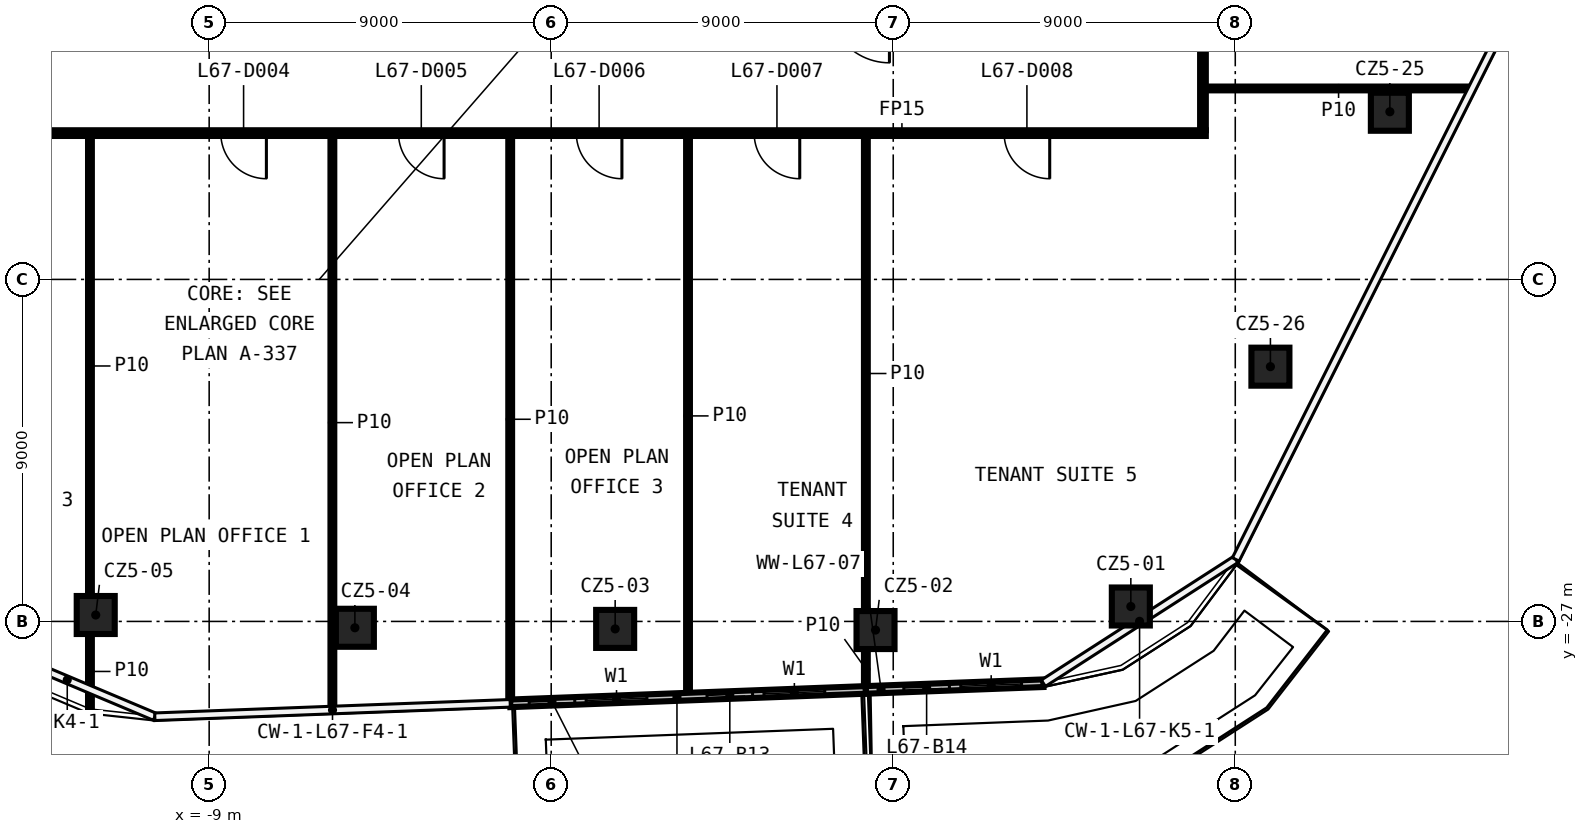
"""IFC4 building model, lengths in metres.
Left out: names, types, materials, properties, quantities, classifications, styles, units other than length and angle.
Written with IfcOpenShell. Run it as: python <this file> out.ifc"""

import sys

from ifc_helpers import new_model, si_unit, direction, frame, frame_2d, origin, origin_2d, place, context, subcontext, project, spatial, rectangle, extrude, element, fill, save


model = new_model("IFC4")
c1 = context("Model", 3, precision=1e-05, world=origin(), true_north=direction((0.0, 1.0)))
c2 = subcontext(c1, "Body", "Model", "MODEL_VIEW")
j1 = project(units=[si_unit("LENGTHUNIT", "METRE"), si_unit("PLANEANGLEUNIT", "RADIAN")], contexts=[c1])
p1 = place(None, origin())
s1 = spatial("IfcSite", under=j1, at=p1, CompositionType="ELEMENT")
p2 = place(p1, origin())
s2 = spatial("IfcBuilding", under=s1, at=p2, CompositionType="ELEMENT")
p3 = place(p2, frame((0.0, 0.0, 315.2)))
s3 = spatial("IfcBuildingStorey", under=s2, at=p3, CompositionType="ELEMENT", Elevation=315.2)
for number, where, z_axis, x_axis in (
    (1, (15.252, -26.607, 0.0), (0.0, 0.0, 1.0), (1.0, 0.0, 0.0)),
    (2, (8.534, -27.227, 0.0), (0.0, 0.0, 1.0), (1.0, 0.0, 0.0)),
    (3, (1.683, -27.197, 0.0), (0.0, 0.0, 1.0), (1.0, 0.0, 0.0)),
    (4, (-5.166, -27.167, 0.0), (0.0, 0.0, 1.0), (1.0, 0.0, 0.0)),
    (5, (-11.985, -26.831, 0.0), (0.0, 0.0, 1.0), (1.0, 0.0, 0.0)),
    (6, (22.068, -13.588, 0.0), (0.0, 0.0, 1.0), (1.0, 0.0, 0.0)),
    (7, (18.925, -20.296, 0.0), (0.0, 0.0, 1.0), (1.0, 0.0, 0.0)),
):
    element("IfcColumn", number, at=place(p3, frame(where, z_axis=z_axis, x_axis=x_axis)), inside=s3, PredefinedType="COLUMN", context=c2, shape_type="SweptSolid", body=[
        extrude(rectangle(XDim=1.0, YDim=1.0, at=origin_2d()), origin(), (0.0, 0.0, 1.0), 3.82),
    ])
p4 = place(p3, frame((17.225, -14.15, 0.0), z_axis=(0.0, 0.0, 1.0), x_axis=(-1.0, 0.0, 0.0)))
e8 = element("IfcWall", 8, at=p4, inside=s3, PredefinedType="PARTITIONING", context=c2, shape_type="SweptSolid", body=[
    extrude(rectangle(XDim=34.45, YDim=0.15, at=frame_2d((17.225, 0.0))), origin(), (0.0, 0.0, 1.0), 3.82),
])
p5 = place(p4, frame((31.269, 0.0, 0.0)))
e9 = element("IfcOpeningElement", 9, at=p5, cuts=e8, PredefinedType="OPENING", context=c2, shape_type="SweptSolid", body=[
    extrude(rectangle(XDim=1.2, YDim=2.1, at=frame_2d((0.6, 1.05))), frame((0.0, 0.085, 0.0), z_axis=(0.0, -1.0, 0.0), x_axis=(1.0, 0.0, 0.0)), (0.0, 0.0, 1.0), 0.17),
])
p6 = place(p4, frame((24.719, 0.0, 0.0)))
e10 = element("IfcOpeningElement", 10, at=p6, cuts=e8, PredefinedType="OPENING", context=c2, shape_type="SweptSolid", body=[
    extrude(rectangle(XDim=1.2, YDim=2.1, at=frame_2d((0.6, 1.05))), frame((0.0, 0.085, 0.0), z_axis=(0.0, -1.0, 0.0), x_axis=(1.0, 0.0, 0.0)), (0.0, 0.0, 1.0), 0.17),
])
p7 = place(p4, frame((20.044, 0.0, 0.0)))
e11 = element("IfcOpeningElement", 11, at=p7, cuts=e8, PredefinedType="OPENING", context=c2, shape_type="SweptSolid", body=[
    extrude(rectangle(XDim=1.2, YDim=2.1, at=frame_2d((0.6, 1.05))), frame((0.0, 0.085, 0.0), z_axis=(0.0, -1.0, 0.0), x_axis=(1.0, 0.0, 0.0)), (0.0, 0.0, 1.0), 0.17),
])
p8 = place(p4, frame((15.364, 0.0, 0.0)))
e12 = element("IfcOpeningElement", 12, at=p8, cuts=e8, PredefinedType="OPENING", context=c2, shape_type="SweptSolid", body=[
    extrude(rectangle(XDim=1.2, YDim=2.1, at=frame_2d((0.6, 1.05))), frame((0.0, 0.085, 0.0), z_axis=(0.0, -1.0, 0.0), x_axis=(1.0, 0.0, 0.0)), (0.0, 0.0, 1.0), 0.17),
])
p9 = place(p4, frame((10.685, 0.0, 0.0)))
e13 = element("IfcOpeningElement", 13, at=p9, cuts=e8, PredefinedType="OPENING", context=c2, shape_type="SweptSolid", body=[
    extrude(rectangle(XDim=1.2, YDim=2.1, at=frame_2d((0.6, 1.05))), frame((0.0, 0.085, 0.0), z_axis=(0.0, -1.0, 0.0), x_axis=(1.0, 0.0, 0.0)), (0.0, 0.0, 1.0), 0.17),
])
p10 = place(p4, frame((4.107, 0.0, 0.0)))
e14 = element("IfcOpeningElement", 14, at=p10, cuts=e8, PredefinedType="OPENING", context=c2, shape_type="SweptSolid", body=[
    extrude(rectangle(XDim=1.2, YDim=2.1, at=frame_2d((0.6, 1.05))), frame((0.0, 0.085, 0.0), z_axis=(0.0, -1.0, 0.0), x_axis=(1.0, 0.0, 0.0)), (0.0, 0.0, 1.0), 0.17),
])
p11 = place(p3, frame((17.225, -12.975, 0.0), z_axis=(0.0, 0.0, 1.0), x_axis=(1.0, 0.0, 0.0)))
e15 = element("IfcWall", 15, at=p11, inside=s3, PredefinedType="PARTITIONING", context=c2, shape_type="SweptSolid", body=[
    extrude(rectangle(XDim=6.987, YDim=0.1, at=frame_2d((3.493, 0.0))), origin(), (0.0, 0.0, 1.0), 3.82),
])
p12 = place(p3, frame((17.15, 14.075, 0.0), z_axis=(0.0, 0.0, 1.0), x_axis=(0.0, -1.0, 0.0)))
e16 = element("IfcWall", 16, at=p12, inside=s3, PredefinedType="PARTITIONING", context=c2, shape_type="SweptSolid", body=[
    extrude(rectangle(XDim=28.15, YDim=0.15, at=frame_2d((14.075, 0.0))), origin(), (0.0, 0.0, 1.0), 3.82),
])
p13 = place(p12, frame((18.182, 0.0, 0.0)))
e17 = element("IfcOpeningElement", 17, at=p13, cuts=e16, PredefinedType="OPENING", context=c2, shape_type="SweptSolid", body=[
    extrude(rectangle(XDim=1.2, YDim=2.1, at=frame_2d((0.6, 1.05))), frame((0.0, 0.085, 0.0), z_axis=(0.0, -1.0, 0.0), x_axis=(1.0, 0.0, 0.0)), (0.0, 0.0, 1.0), 0.17),
])
p14 = place(p12, frame((10.811, 0.0, 0.0)))
e18 = element("IfcOpeningElement", 18, at=p14, cuts=e16, PredefinedType="OPENING", context=c2, shape_type="SweptSolid", body=[
    extrude(rectangle(XDim=1.2, YDim=2.1, at=frame_2d((0.6, 1.05))), frame((0.0, 0.085, 0.0), z_axis=(0.0, -1.0, 0.0), x_axis=(1.0, 0.0, 0.0)), (0.0, 0.0, 1.0), 0.17),
])
p15 = place(p12, frame((3.647, 0.0, 0.0)))
e19 = element("IfcOpeningElement", 19, at=p15, cuts=e16, PredefinedType="OPENING", context=c2, shape_type="SweptSolid", body=[
    extrude(rectangle(XDim=1.2, YDim=2.1, at=frame_2d((0.6, 1.05))), frame((0.0, 0.085, 0.0), z_axis=(0.0, -1.0, 0.0), x_axis=(1.0, 0.0, 0.0)), (0.0, 0.0, 1.0), 0.17),
])
p16 = place(p3, frame((8.28, -28.782, 0.0), z_axis=(0.0, 0.0, 1.0), x_axis=(0.0, 1.0, 0.0)))
e20 = element("IfcWall", 20, at=p16, inside=s3, PredefinedType="PARTITIONING", context=c2, shape_type="SweptSolid", body=[
    extrude(rectangle(XDim=1.055, YDim=0.1, at=frame_2d((0.528, 0.0))), origin(), (0.0, 0.0, 1.0), 3.82),
])
p17 = place(p3, frame((8.28, -26.727, 0.0), z_axis=(0.0, 0.0, 1.0), x_axis=(0.0, 1.0, 0.0)))
e21 = element("IfcWall", 21, at=p17, inside=s3, PredefinedType="PARTITIONING", context=c2, shape_type="SweptSolid", body=[
    extrude(rectangle(XDim=12.502, YDim=0.1, at=frame_2d((6.251, 0.0))), origin(), (0.0, 0.0, 1.0), 3.82),
])
p18 = place(p3, frame((3.6, -28.959, 0.0), z_axis=(0.0, 0.0, 1.0), x_axis=(0.0, 1.0, 0.0)))
e22 = element("IfcWall", 22, at=p18, inside=s3, PredefinedType="PARTITIONING", context=c2, shape_type="SweptSolid", body=[
    extrude(rectangle(XDim=14.734, YDim=0.1, at=frame_2d((7.367, 0.0))), origin(), (0.0, 0.0, 1.0), 3.82),
])
p19 = place(p3, frame((-1.079, -29.135, 0.0), z_axis=(0.0, 0.0, 1.0), x_axis=(0.0, 1.0, 0.0)))
e23 = element("IfcWall", 23, at=p19, inside=s3, PredefinedType="PARTITIONING", context=c2, shape_type="SweptSolid", body=[
    extrude(rectangle(XDim=14.91, YDim=0.1, at=frame_2d((7.455, 0.0))), origin(), (0.0, 0.0, 1.0), 3.82),
])
p20 = place(p3, frame((-5.758, -29.312, 0.0), z_axis=(0.0, 0.0, 1.0), x_axis=(0.0, 1.0, 0.0)))
e24 = element("IfcWall", 24, at=p20, inside=s3, PredefinedType="PARTITIONING", context=c2, shape_type="SweptSolid", body=[
    extrude(rectangle(XDim=15.087, YDim=0.1, at=frame_2d((7.543, 0.0))), origin(), (0.0, 0.0, 1.0), 3.82),
])
p21 = place(p3, frame((-12.137, -29.302, 0.0), z_axis=(0.0, 0.0, 1.0), x_axis=(0.0, 1.0, 0.0)))
e25 = element("IfcWall", 25, at=p21, inside=s3, PredefinedType="PARTITIONING", context=c2, shape_type="SweptSolid", body=[
    extrude(rectangle(XDim=1.971, YDim=0.1, at=frame_2d((0.985, 0.0))), origin(), (0.0, 0.0, 1.0), 3.82),
])
p22 = place(p3, frame((-12.137, -26.331, 0.0), z_axis=(0.0, 0.0, 1.0), x_axis=(0.0, 1.0, 0.0)))
e26 = element("IfcWall", 26, at=p22, inside=s3, PredefinedType="PARTITIONING", context=c2, shape_type="SweptSolid", body=[
    extrude(rectangle(XDim=12.106, YDim=0.1, at=frame_2d((6.053, 0.0))), origin(), (0.0, 0.0, 1.0), 3.82),
])
p23 = place(p3, frame((-1.079, -29.156, 0.0), z_axis=(0.0, 0.0, 1.0), x_axis=(0.999288261827, 0.037722271597, 0.0)))
e27 = element("IfcWall", 27, at=p23, inside=s3, PredefinedType="SOLIDWALL", context=c2, shape_type="SweptSolid", body=[
    extrude(rectangle(XDim=9.365, YDim=0.2, at=frame_2d((4.683, 0.0))), origin(), (0.0, 0.0, 1.0), 3.82),
])
p24 = place(p23, frame((2.0, 0.0, 0.6)))
e28 = element("IfcOpeningElement", 28, at=p24, cuts=e27, PredefinedType="OPENING", context=c2, shape_type="SweptSolid", body=[
    extrude(rectangle(XDim=1.6, YDim=2.4, at=frame_2d((0.8, 1.2))), frame((0.0, 0.11, 0.0), z_axis=(0.0, -1.0, 0.0), x_axis=(1.0, 0.0, 0.0)), (0.0, 0.0, 1.0), 0.22),
])
p25 = place(p23, frame((0.5, 0.0, 0.0)))
e29 = element("IfcOpeningElement", 29, at=p25, cuts=e27, PredefinedType="OPENING", context=c2, shape_type="SweptSolid", body=[
    extrude(rectangle(XDim=1.2, YDim=2.4, at=frame_2d((0.6, 1.2))), frame((0.0, 0.11, 0.0), z_axis=(0.0, -1.0, 0.0), x_axis=(1.0, 0.0, 0.0)), (0.0, 0.0, 1.0), 0.22),
])
p26 = place(p23, frame((6.683, 0.0, 0.6)))
e30 = element("IfcOpeningElement", 30, at=p26, cuts=e27, PredefinedType="OPENING", context=c2, shape_type="SweptSolid", body=[
    extrude(rectangle(XDim=1.6, YDim=2.4, at=frame_2d((0.8, 1.2))), frame((0.0, 0.11, 0.0), z_axis=(0.0, -1.0, 0.0), x_axis=(1.0, 0.0, 0.0)), (0.0, 0.0, 1.0), 0.22),
])
p27 = place(p23, frame((5.183, 0.0, 0.0)))
e31 = element("IfcOpeningElement", 31, at=p27, cuts=e27, PredefinedType="OPENING", context=c2, shape_type="SweptSolid", body=[
    extrude(rectangle(XDim=1.2, YDim=2.4, at=frame_2d((0.6, 1.2))), frame((0.0, 0.11, 0.0), z_axis=(0.0, -1.0, 0.0), x_axis=(1.0, 0.0, 0.0)), (0.0, 0.0, 1.0), 0.22),
])
p28 = place(p3, frame((8.28, -28.802, 0.0), z_axis=(0.0, 0.0, 1.0), x_axis=(0.999288539502, 0.037714915082, 0.0)))
e32 = element("IfcWall", 32, at=p28, inside=s3, PredefinedType="SOLIDWALL", context=c2, shape_type="SweptSolid", body=[
    extrude(rectangle(XDim=4.674, YDim=0.2, at=frame_2d((2.337, 0.0))), origin(), (0.0, 0.0, 1.0), 3.82),
])
p29 = place(p28, frame((2.5, 0.0, 0.6)))
e33 = element("IfcOpeningElement", 33, at=p29, cuts=e32, PredefinedType="OPENING", context=c2, shape_type="SweptSolid", body=[
    extrude(rectangle(XDim=1.6, YDim=2.4, at=frame_2d((0.8, 1.2))), frame((0.0, 0.11, 0.0), z_axis=(0.0, -1.0, 0.0), x_axis=(1.0, 0.0, 0.0)), (0.0, 0.0, 1.0), 0.22),
])
p30 = place(p28, frame((1.0, 0.0, 0.0)))
e34 = element("IfcOpeningElement", 34, at=p30, cuts=e32, PredefinedType="OPENING", context=c2, shape_type="SweptSolid", body=[
    extrude(rectangle(XDim=1.2, YDim=2.4, at=frame_2d((0.6, 1.2))), frame((0.0, 0.11, 0.0), z_axis=(0.0, -1.0, 0.0), x_axis=(1.0, 0.0, 0.0)), (0.0, 0.0, 1.0), 0.22),
])
p31 = place(p6, origin())
e35 = element("IfcDoor", 35, at=p31, inside=s3, OperationType="SINGLE_SWING_LEFT", PredefinedType="DOOR", context=c2, shape_type="SweptSolid", body=[
    extrude(rectangle(XDim=1.2, YDim=2.1, at=frame_2d((0.6, 1.05))), frame((0.0, 0.025, 0.0), z_axis=(0.0, -1.0, 0.0), x_axis=(1.0, 0.0, 0.0)), (0.0, 0.0, 1.0), 0.05),
])
fill(e10, e35)
p32 = place(p7, origin())
e36 = element("IfcDoor", 36, at=p32, inside=s3, OperationType="SINGLE_SWING_RIGHT", PredefinedType="DOOR", context=c2, shape_type="SweptSolid", body=[
    extrude(rectangle(XDim=1.2, YDim=2.1, at=frame_2d((0.6, 1.05))), frame((0.0, 0.025, 0.0), z_axis=(0.0, -1.0, 0.0), x_axis=(1.0, 0.0, 0.0)), (0.0, 0.0, 1.0), 0.05),
])
fill(e11, e36)
p33 = place(p8, origin())
e37 = element("IfcDoor", 37, at=p33, inside=s3, OperationType="SINGLE_SWING_LEFT", PredefinedType="DOOR", context=c2, shape_type="SweptSolid", body=[
    extrude(rectangle(XDim=1.2, YDim=2.1, at=frame_2d((0.6, 1.05))), frame((0.0, 0.025, 0.0), z_axis=(0.0, -1.0, 0.0), x_axis=(1.0, 0.0, 0.0)), (0.0, 0.0, 1.0), 0.05),
])
fill(e12, e37)
p34 = place(p9, origin())
e38 = element("IfcDoor", 38, at=p34, inside=s3, OperationType="SINGLE_SWING_RIGHT", PredefinedType="DOOR", context=c2, shape_type="SweptSolid", body=[
    extrude(rectangle(XDim=1.2, YDim=2.1, at=frame_2d((0.6, 1.05))), frame((0.0, 0.025, 0.0), z_axis=(0.0, -1.0, 0.0), x_axis=(1.0, 0.0, 0.0)), (0.0, 0.0, 1.0), 0.05),
])
fill(e13, e38)
p35 = place(p10, origin())
e39 = element("IfcDoor", 39, at=p35, inside=s3, OperationType="SINGLE_SWING_LEFT", PredefinedType="DOOR", context=c2, shape_type="SweptSolid", body=[
    extrude(rectangle(XDim=1.2, YDim=2.1, at=frame_2d((0.6, 1.05))), frame((0.0, 0.025, 0.0), z_axis=(0.0, -1.0, 0.0), x_axis=(1.0, 0.0, 0.0)), (0.0, 0.0, 1.0), 0.05),
])
fill(e14, e39)
p36 = place(p24, origin())
e40 = element("IfcWindow", 40, at=p36, inside=s3, PartitioningType="SINGLE_PANEL", PredefinedType="WINDOW", context=c2, shape_type="SweptSolid", body=[
    extrude(rectangle(XDim=1.6, YDim=2.4, at=frame_2d((0.8, 1.2))), frame((0.0, 0.03, 0.0), z_axis=(0.0, -1.0, 0.0), x_axis=(1.0, 0.0, 0.0)), (0.0, 0.0, 1.0), 0.06),
])
fill(e28, e40)
p37 = place(p25, origin())
e41 = element("IfcDoor", 41, at=p37, inside=s3, OperationType="SLIDING_TO_LEFT", PredefinedType="DOOR", context=c2, shape_type="SweptSolid", body=[
    extrude(rectangle(XDim=1.2, YDim=2.4, at=frame_2d((0.6, 1.2))), frame((0.0, 0.025, 0.0), z_axis=(0.0, -1.0, 0.0), x_axis=(1.0, 0.0, 0.0)), (0.0, 0.0, 1.0), 0.05),
])
fill(e29, e41)
p38 = place(p26, origin())
e42 = element("IfcWindow", 42, at=p38, inside=s3, PartitioningType="SINGLE_PANEL", PredefinedType="WINDOW", context=c2, shape_type="SweptSolid", body=[
    extrude(rectangle(XDim=1.6, YDim=2.4, at=frame_2d((0.8, 1.2))), frame((0.0, 0.03, 0.0), z_axis=(0.0, -1.0, 0.0), x_axis=(1.0, 0.0, 0.0)), (0.0, 0.0, 1.0), 0.06),
])
fill(e30, e42)
p39 = place(p27, origin())
e43 = element("IfcDoor", 43, at=p39, inside=s3, OperationType="SLIDING_TO_LEFT", PredefinedType="DOOR", context=c2, shape_type="SweptSolid", body=[
    extrude(rectangle(XDim=1.2, YDim=2.4, at=frame_2d((0.6, 1.2))), frame((0.0, 0.025, 0.0), z_axis=(0.0, -1.0, 0.0), x_axis=(1.0, 0.0, 0.0)), (0.0, 0.0, 1.0), 0.05),
])
fill(e31, e43)
p40 = place(p29, origin())
e44 = element("IfcWindow", 44, at=p40, inside=s3, PartitioningType="SINGLE_PANEL", PredefinedType="WINDOW", context=c2, shape_type="SweptSolid", body=[
    extrude(rectangle(XDim=1.6, YDim=2.4, at=frame_2d((0.8, 1.2))), frame((0.0, 0.03, 0.0), z_axis=(0.0, -1.0, 0.0), x_axis=(1.0, 0.0, 0.0)), (0.0, 0.0, 1.0), 0.06),
])
fill(e33, e44)
p41 = place(p30, origin())
e45 = element("IfcDoor", 45, at=p41, inside=s3, OperationType="SLIDING_TO_LEFT", PredefinedType="DOOR", context=c2, shape_type="SweptSolid", body=[
    extrude(rectangle(XDim=1.2, YDim=2.4, at=frame_2d((0.6, 1.2))), frame((0.0, 0.025, 0.0), z_axis=(0.0, -1.0, 0.0), x_axis=(1.0, 0.0, 0.0)), (0.0, 0.0, 1.0), 0.05),
])
fill(e34, e45)
save(model, sys.argv[1])
